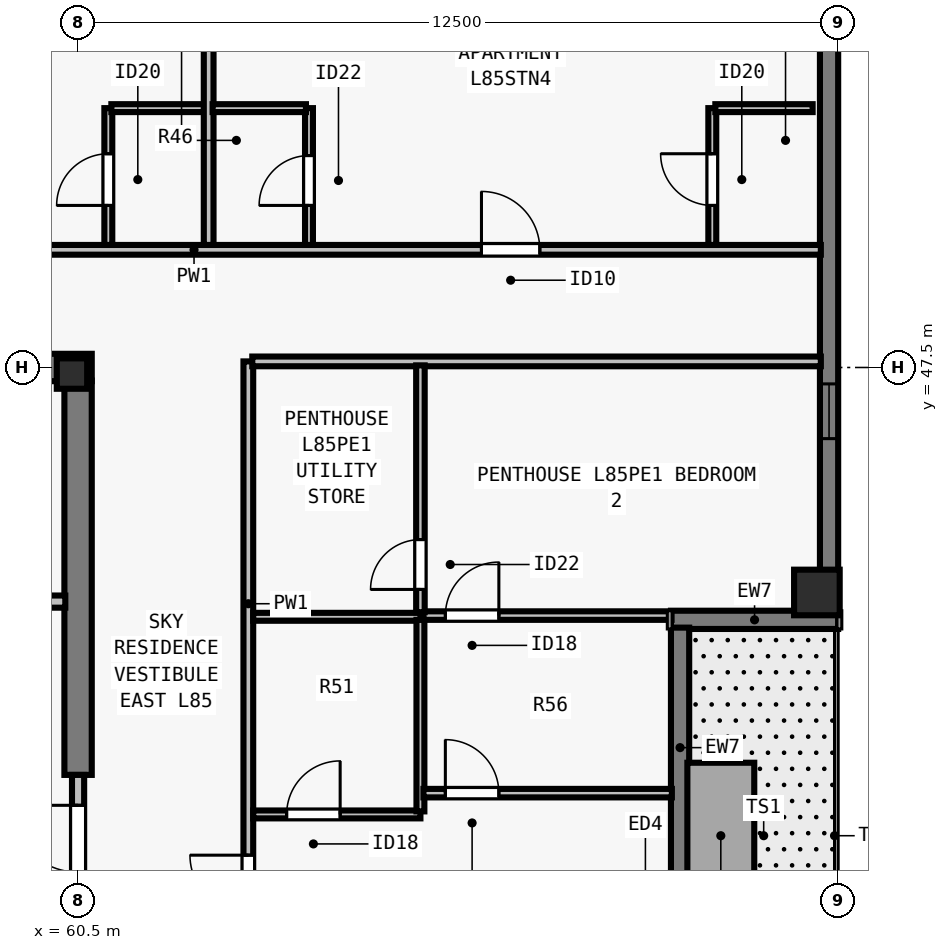
"""IFC4 building model, lengths in metres.
Left out: names, types, materials, properties, quantities, classifications, styles, units other than length and angle.
Written with IfcOpenShell. Run it as: python <this file> out.ifc"""

import sys

from ifc_helpers import new_model, si_unit, direction, frame, frame_2d, origin, origin_2d, place, context, subcontext, project, spatial, rectangle, i_section, extrude, element, fill, save


model = new_model("IFC4")
c1 = context("Model", 3, precision=1e-05, world=origin(), true_north=direction((0.0, 1.0)))
c2 = subcontext(c1, "Body", "Model", "MODEL_VIEW")
j1 = project(units=[si_unit("LENGTHUNIT", "METRE"), si_unit("PLANEANGLEUNIT", "RADIAN")], contexts=[c1])
p1 = place(None, origin())
s1 = spatial("IfcSite", under=j1, at=p1, CompositionType="ELEMENT")
p2 = place(p1, origin())
s2 = spatial("IfcBuilding", under=s1, at=p2, CompositionType="ELEMENT")
p3 = place(p2, frame((0.0, 0.0, 308.5)))
s3 = spatial("IfcBuildingStorey", under=s2, at=p3, CompositionType="ELEMENT", Elevation=308.5)
p4 = place(p3, frame((60.4, 47.4, 0.0), z_axis=(0.0, 0.0, 1.0), x_axis=(1.0, 0.0, 0.0)))
e1 = element("IfcColumn", 1, at=p4, inside=s3, PredefinedType="COLUMN", context=c2, shape_type="SweptSolid", body=[
    extrude(i_section(OverallWidth=0.5, OverallDepth=0.5, WebThickness=0.028, FlangeThickness=0.045, at=origin_2d()), origin(), (0.0, 0.0, 1.0), 3.5),
])
p5 = place(p3, frame((72.65, 43.8, 0.0), z_axis=(0.0, 0.0, 1.0), x_axis=(0.0, 1.0, 0.0)))
e2 = element("IfcColumn", 2, at=p5, inside=s3, PredefinedType="COLUMN", context=c2, shape_type="SweptSolid", body=[
    extrude(rectangle(XDim=0.75, YDim=0.75, at=origin_2d()), origin(), (0.0, 0.0, 1.0), 3.5),
])
p6 = place(p3, frame((72.85, 54.5, 0.0), z_axis=(0.0, 0.0, 1.0), x_axis=(0.0, -1.0, 0.0)))
e3 = element("IfcWall", 3, at=p6, inside=s3, PredefinedType="SOLIDWALL", context=c2, shape_type="SweptSolid", body=[
    extrude(rectangle(XDim=11.022, YDim=0.3, at=frame_2d((5.511, 0.0))), origin(), (0.0, 0.0, 1.0), 3.29),
])
p7 = place(p6, frame((7.27, 0.0, 0.8)))
e4 = element("IfcOpeningElement", 4, at=p7, cuts=e3, PredefinedType="OPENING", context=c2, shape_type="SweptSolid", body=[
    extrude(rectangle(XDim=0.9, YDim=1.75, at=frame_2d((0.45, 0.875))), frame((0.0, 0.16, 0.0), z_axis=(0.0, -1.0, 0.0), x_axis=(1.0, 0.0, 0.0)), (0.0, 0.0, 1.0), 0.32),
])
p8 = place(p3, frame((73.0, 43.35, 0.0), z_axis=(0.0, 0.0, 1.0), x_axis=(-1.0, 0.0, 0.0)))
e5 = element("IfcWall", 5, at=p8, inside=s3, PredefinedType="SOLIDWALL", context=c2, shape_type="SweptSolid", body=[
    extrude(rectangle(XDim=2.75, YDim=0.3, at=frame_2d((1.375, 0.0))), origin(), (0.0, 0.0, 1.0), 3.29),
])
p9 = place(p3, frame((70.4, 43.222, 0.0), z_axis=(0.0, 0.0, 1.0), x_axis=(0.0, -1.0, 0.0)))
e6 = element("IfcWall", 6, at=p9, inside=s3, PredefinedType="SOLIDWALL", context=c2, shape_type="SweptSolid", body=[
    extrude(rectangle(XDim=7.122, YDim=0.3, at=frame_2d((3.561, 0.0))), origin(), (0.0, 0.0, 1.0), 3.29),
])
p10 = place(p9, frame((4.097, 0.0, 0.0)))
e7 = element("IfcOpeningElement", 7, at=p10, cuts=e6, PredefinedType="OPENING", context=c2, shape_type="SweptSolid", body=[
    extrude(rectangle(XDim=1.0, YDim=2.15, at=frame_2d((0.5, 1.075))), frame((0.0, 0.16, 0.0), z_axis=(0.0, -1.0, 0.0), x_axis=(1.0, 0.0, 0.0)), (0.0, 0.0, 1.0), 0.32),
])
p11 = place(p3, frame((43.275, 47.5, 0.0), z_axis=(0.0, 0.0, 1.0), x_axis=(1.0, 0.0, 0.0)))
e8 = element("IfcWall", 8, at=p11, inside=s3, PredefinedType="SHEAR", context=c2, shape_type="SweptSolid", body=[
    extrude(rectangle(XDim=17.45, YDim=0.45, at=frame_2d((8.725, 0.0))), origin(), (0.0, 0.0, 1.0), 3.29),
])
p12 = place(p3, frame((60.5, 40.8, 0.0), z_axis=(0.0, 0.0, 1.0), x_axis=(0.0, 1.0, 0.0)))
e9 = element("IfcWall", 9, at=p12, inside=s3, PredefinedType="SHEAR", context=c2, shape_type="SweptSolid", body=[
    extrude(rectangle(XDim=6.485, YDim=0.45, at=frame_2d((3.242, 0.0))), origin(), (0.0, 0.0, 1.0), 3.29),
])
p13 = place(p3, frame((60.5, 38.75, 0.0), z_axis=(0.0, 0.0, 1.0), x_axis=(0.0, 1.0, 0.0)))
e10 = element("IfcWall", 10, at=p13, inside=s3, PredefinedType="SOLIDWALL", context=c2, shape_type="SweptSolid", body=[
    extrude(rectangle(XDim=2.05, YDim=0.2, at=frame_2d((1.025, 0.0))), origin(), (0.0, 0.0, 1.0), 3.29),
])
p14 = place(p13, frame((0.45, 0.0, 0.0)))
e11 = element("IfcOpeningElement", 11, at=p14, cuts=e10, PredefinedType="OPENING", context=c2, shape_type="SweptSolid", body=[
    extrude(rectangle(XDim=1.1, YDim=2.15, at=frame_2d((0.55, 1.075))), frame((0.0, 0.11, 0.0), z_axis=(0.0, -1.0, 0.0), x_axis=(1.0, 0.0, 0.0)), (0.0, 0.0, 1.0), 0.22),
])
p15 = place(p3, frame((56.735, 43.65, 0.0), z_axis=(0.0, 0.0, 1.0), x_axis=(1.0, 0.0, 0.0)))
e12 = element("IfcWall", 12, at=p15, inside=s3, PredefinedType="SOLIDWALL", context=c2, shape_type="SweptSolid", body=[
    extrude(rectangle(XDim=3.555, YDim=0.2, at=frame_2d((1.777, 0.0))), origin(), (0.0, 0.0, 1.0), 3.29),
])
p16 = place(p15, frame((1.295, 0.0, 0.0)))
e13 = element("IfcOpeningElement", 13, at=p16, cuts=e12, PredefinedType="OPENING", context=c2, shape_type="SweptSolid", body=[
    extrude(rectangle(XDim=1.1, YDim=2.2, at=frame_2d((0.55, 1.1))), frame((0.0, 0.11, 0.0), z_axis=(0.0, -1.0, 0.0), x_axis=(1.0, 0.0, 0.0)), (0.0, 0.0, 1.0), 0.22),
])
p17 = place(p3, frame((31.285, 49.435, 0.0), z_axis=(0.0, 0.0, 1.0), x_axis=(1.0, 0.0, 0.0)))
e14 = element("IfcWall", 14, at=p17, inside=s3, PredefinedType="PARTITIONING", context=c2, shape_type="SweptSolid", body=[
    extrude(rectangle(XDim=41.43, YDim=0.16, at=frame_2d((20.715, 0.0))), origin(), (0.0, 0.0, 1.0), 3.009),
])
p18 = place(p17, frame((4.979, 0.0, 0.0)))
e15 = element("IfcOpeningElement", 15, at=p18, cuts=e14, PredefinedType="OPENING", context=c2, shape_type="SweptSolid", body=[
    extrude(rectangle(XDim=0.96, YDim=2.18, at=frame_2d((0.48, 1.09))), frame((0.0, 0.09, 0.0), z_axis=(0.0, -1.0, 0.0), x_axis=(1.0, 0.0, 0.0)), (0.0, 0.0, 1.0), 0.18),
])
p19 = place(p17, frame((15.145, 0.0, 0.0)))
e16 = element("IfcOpeningElement", 16, at=p19, cuts=e14, PredefinedType="OPENING", context=c2, shape_type="SweptSolid", body=[
    extrude(rectangle(XDim=0.96, YDim=2.18, at=frame_2d((0.48, 1.09))), frame((0.0, 0.09, 0.0), z_axis=(0.0, -1.0, 0.0), x_axis=(1.0, 0.0, 0.0)), (0.0, 0.0, 1.0), 0.18),
])
p20 = place(p17, frame((25.435, 0.0, 0.0)))
e17 = element("IfcOpeningElement", 17, at=p20, cuts=e14, PredefinedType="OPENING", context=c2, shape_type="SweptSolid", body=[
    extrude(rectangle(XDim=0.96, YDim=2.18, at=frame_2d((0.48, 1.09))), frame((0.0, 0.09, 0.0), z_axis=(0.0, -1.0, 0.0), x_axis=(1.0, 0.0, 0.0)), (0.0, 0.0, 1.0), 0.18),
])
p21 = place(p17, frame((35.849, 0.0, 0.0)))
e18 = element("IfcOpeningElement", 18, at=p21, cuts=e14, PredefinedType="OPENING", context=c2, shape_type="SweptSolid", body=[
    extrude(rectangle(XDim=0.96, YDim=2.18, at=frame_2d((0.48, 1.09))), frame((0.0, 0.09, 0.0), z_axis=(0.0, -1.0, 0.0), x_axis=(1.0, 0.0, 0.0)), (0.0, 0.0, 1.0), 0.18),
])
p22 = place(p3, frame((63.3, 30.4, 0.0), z_axis=(0.0, 0.0, 1.0), x_axis=(0.0, 1.0, 0.0)))
e19 = element("IfcWall", 19, at=p22, inside=s3, PredefinedType="PARTITIONING", context=c2, shape_type="SweptSolid", body=[
    extrude(rectangle(XDim=17.2, YDim=0.16, at=frame_2d((8.6, 0.0))), origin(), (0.0, 0.0, 1.0), 3.29),
])
p23 = place(p22, frame((8.12, 0.0, 0.0)))
e20 = element("IfcOpeningElement", 20, at=p23, cuts=e19, PredefinedType="OPENING", context=c2, shape_type="SweptSolid", body=[
    extrude(rectangle(XDim=0.96, YDim=2.18, at=frame_2d((0.48, 1.09))), frame((0.0, 0.09, 0.0), z_axis=(0.0, -1.0, 0.0), x_axis=(1.0, 0.0, 0.0)), (0.0, 0.0, 1.0), 0.18),
])
p24 = place(p3, frame((63.365, 47.6, 0.0), z_axis=(0.0, 0.0, 1.0), x_axis=(1.0, 0.0, 0.0)))
e21 = element("IfcWall", 21, at=p24, inside=s3, PredefinedType="PARTITIONING", context=c2, shape_type="SweptSolid", body=[
    extrude(rectangle(XDim=9.35, YDim=0.16, at=frame_2d((4.675, 0.0))), origin(), (0.0, 0.0, 1.0), 3.29),
])
p25 = place(p3, frame((60.998, 49.515, 0.0), z_axis=(0.0, 0.0, 1.0), x_axis=(0.0, 1.0, 0.0)))
e22 = element("IfcWall", 22, at=p25, inside=s3, PredefinedType="PLUMBINGWALL", context=c2, shape_type="SweptSolid", body=[
    extrude(rectangle(XDim=2.25, YDim=0.13, at=frame_2d((1.125, 0.0))), origin(), (0.0, 0.0, 1.0), 3.29),
])
p26 = place(p25, frame((0.65, 0.0, 0.0)))
e23 = element("IfcOpeningElement", 23, at=p26, cuts=e22, PredefinedType="OPENING", context=c2, shape_type="SweptSolid", body=[
    extrude(rectangle(XDim=0.85, YDim=2.1, at=frame_2d((0.425, 1.05))), frame((0.0, 0.075, 0.0), z_axis=(0.0, -1.0, 0.0), x_axis=(1.0, 0.0, 0.0)), (0.0, 0.0, 1.0), 0.15),
])
p27 = place(p3, frame((61.048, 51.765, 0.0), z_axis=(0.0, 0.0, 1.0), x_axis=(1.0, 0.0, 0.0)))
e24 = element("IfcWall", 24, at=p27, inside=s3, PredefinedType="PLUMBINGWALL", context=c2, shape_type="SweptSolid", body=[
    extrude(rectangle(XDim=1.6, YDim=0.13, at=frame_2d((0.8, 0.0))), origin(), (0.0, 0.0, 1.0), 3.29),
])
p28 = place(p3, frame((62.647, 49.515, 0.0), z_axis=(0.0, 0.0, 1.0), x_axis=(0.0, 1.0, 0.0)))
e25 = element("IfcWall", 25, at=p28, inside=s3, PredefinedType="PARTITIONING", context=c2, shape_type="SweptSolid", body=[
    extrude(rectangle(XDim=10.185, YDim=0.16, at=frame_2d((5.093, 0.0))), origin(), (0.0, 0.0, 1.0), 2.653),
])
p29 = place(p3, frame((64.298, 49.515, 0.0), z_axis=(0.0, 0.0, 1.0), x_axis=(0.0, 1.0, 0.0)))
e26 = element("IfcWall", 26, at=p29, inside=s3, PredefinedType="PLUMBINGWALL", context=c2, shape_type="SweptSolid", body=[
    extrude(rectangle(XDim=2.25, YDim=0.13, at=frame_2d((1.125, 0.0))), origin(), (0.0, 0.0, 1.0), 3.29),
])
p30 = place(p29, frame((0.65, 0.0, 0.0)))
e27 = element("IfcOpeningElement", 27, at=p30, cuts=e26, PredefinedType="OPENING", context=c2, shape_type="SweptSolid", body=[
    extrude(rectangle(XDim=0.82, YDim=2.1, at=frame_2d((0.41, 1.05))), frame((0.0, 0.075, 0.0), z_axis=(0.0, -1.0, 0.0), x_axis=(1.0, 0.0, 0.0)), (0.0, 0.0, 1.0), 0.15),
])
p31 = place(p3, frame((62.712, 51.765, 0.0), z_axis=(0.0, 0.0, 1.0), x_axis=(1.0, 0.0, 0.0)))
e28 = element("IfcWall", 28, at=p31, inside=s3, PredefinedType="PLUMBINGWALL", context=c2, shape_type="SweptSolid", body=[
    extrude(rectangle(XDim=1.535, YDim=0.13, at=frame_2d((0.768, 0.0))), origin(), (0.0, 0.0, 1.0), 3.29),
])
p32 = place(p3, frame((70.93, 49.515, 0.0), z_axis=(0.0, 0.0, 1.0), x_axis=(0.0, 1.0, 0.0)))
e29 = element("IfcWall", 29, at=p32, inside=s3, PredefinedType="PLUMBINGWALL", context=c2, shape_type="SweptSolid", body=[
    extrude(rectangle(XDim=2.25, YDim=0.13, at=frame_2d((1.125, 0.0))), origin(), (0.0, 0.0, 1.0), 3.29),
])
p33 = place(p32, frame((0.65, 0.0, 0.0)))
e30 = element("IfcOpeningElement", 30, at=p33, cuts=e29, PredefinedType="OPENING", context=c2, shape_type="SweptSolid", body=[
    extrude(rectangle(XDim=0.85, YDim=2.1, at=frame_2d((0.425, 1.05))), frame((0.0, 0.075, 0.0), z_axis=(0.0, -1.0, 0.0), x_axis=(1.0, 0.0, 0.0)), (0.0, 0.0, 1.0), 0.15),
])
p34 = place(p3, frame((70.98, 51.765, 0.0), z_axis=(0.0, 0.0, 1.0), x_axis=(1.0, 0.0, 0.0)))
e31 = element("IfcWall", 31, at=p34, inside=s3, PredefinedType="PLUMBINGWALL", context=c2, shape_type="SweptSolid", body=[
    extrude(rectangle(XDim=1.6, YDim=0.13, at=frame_2d((0.8, 0.0))), origin(), (0.0, 0.0, 1.0), 3.29),
])
p35 = place(p3, frame((63.38, 43.4, 0.0), z_axis=(0.0, 0.0, 1.0), x_axis=(1.0, 0.0, 0.0)))
e32 = element("IfcWall", 32, at=p35, inside=s3, PredefinedType="PLUMBINGWALL", context=c2, shape_type="SweptSolid", body=[
    extrude(rectangle(XDim=2.75, YDim=0.13, at=frame_2d((1.375, 0.0))), origin(), (0.0, 0.0, 1.0), 3.29),
])
p36 = place(p3, frame((63.38, 40.15, 0.0), z_axis=(0.0, 0.0, 1.0), x_axis=(1.0, 0.0, 0.0)))
e33 = element("IfcWall", 33, at=p36, inside=s3, PredefinedType="PLUMBINGWALL", context=c2, shape_type="SweptSolid", body=[
    extrude(rectangle(XDim=2.75, YDim=0.13, at=frame_2d((1.375, 0.0))), origin(), (0.0, 0.0, 1.0), 3.29),
])
p37 = place(p36, frame((0.55, 0.0, 0.0)))
e34 = element("IfcOpeningElement", 34, at=p37, cuts=e33, PredefinedType="OPENING", context=c2, shape_type="SweptSolid", body=[
    extrude(rectangle(XDim=0.88, YDim=2.1, at=frame_2d((0.44, 1.05))), frame((0.0, 0.075, 0.0), z_axis=(0.0, -1.0, 0.0), x_axis=(1.0, 0.0, 0.0)), (0.0, 0.0, 1.0), 0.15),
])
p38 = place(p3, frame((66.13, 40.2, 0.0), z_axis=(0.0, 0.0, 1.0), x_axis=(0.0, 1.0, 0.0)))
e35 = element("IfcWall", 35, at=p38, inside=s3, PredefinedType="PLUMBINGWALL", context=c2, shape_type="SweptSolid", body=[
    extrude(rectangle(XDim=3.15, YDim=0.13, at=frame_2d((1.575, 0.0))), origin(), (0.0, 0.0, 1.0), 3.29),
])
p39 = place(p3, frame((66.18, 43.42, 0.0), z_axis=(0.0, 0.0, 1.0), x_axis=(1.0, 0.0, 0.0)))
e36 = element("IfcWall", 36, at=p39, inside=s3, PredefinedType="PARTITIONING", context=c2, shape_type="SweptSolid", body=[
    extrude(rectangle(XDim=4.08, YDim=0.14, at=frame_2d((2.04, 0.0))), origin(), (0.0, 0.0, 1.0), 3.29),
])
p40 = place(p39, frame((0.36, 0.0, 0.0)))
e37 = element("IfcOpeningElement", 37, at=p40, cuts=e36, PredefinedType="OPENING", context=c2, shape_type="SweptSolid", body=[
    extrude(rectangle(XDim=0.88, YDim=2.1, at=frame_2d((0.44, 1.05))), frame((0.0, 0.08, 0.0), z_axis=(0.0, -1.0, 0.0), x_axis=(1.0, 0.0, 0.0)), (0.0, 0.0, 1.0), 0.16),
])
p41 = place(p3, frame((66.13, 43.475, 0.0), z_axis=(0.0, 0.0, 1.0), x_axis=(0.0, 1.0, 0.0)))
e38 = element("IfcWall", 38, at=p41, inside=s3, PredefinedType="PARTITIONING", context=c2, shape_type="SweptSolid", body=[
    extrude(rectangle(XDim=4.06, YDim=0.14, at=frame_2d((2.03, 0.0))), origin(), (0.0, 0.0, 1.0), 3.29),
])
p42 = place(p41, frame((0.375, 0.0, 0.0)))
e39 = element("IfcOpeningElement", 39, at=p42, cuts=e38, PredefinedType="OPENING", context=c2, shape_type="SweptSolid", body=[
    extrude(rectangle(XDim=0.82, YDim=2.1, at=frame_2d((0.41, 1.05))), frame((0.0, 0.08, 0.0), z_axis=(0.0, -1.0, 0.0), x_axis=(1.0, 0.0, 0.0)), (0.0, 0.0, 1.0), 0.16),
])
p43 = place(p3, frame((66.18, 40.5, 0.0), z_axis=(0.0, 0.0, 1.0), x_axis=(1.0, 0.0, 0.0)))
e40 = element("IfcWall", 40, at=p43, inside=s3, PredefinedType="PARTITIONING", context=c2, shape_type="SweptSolid", body=[
    extrude(rectangle(XDim=4.085, YDim=0.14, at=frame_2d((2.042, 0.0))), origin(), (0.0, 0.0, 1.0), 3.29),
])
p44 = place(p43, frame((0.36, 0.0, 0.0)))
e41 = element("IfcOpeningElement", 41, at=p44, cuts=e40, PredefinedType="OPENING", context=c2, shape_type="SweptSolid", body=[
    extrude(rectangle(XDim=0.88, YDim=2.1, at=frame_2d((0.44, 1.05))), frame((0.0, 0.08, 0.0), z_axis=(0.0, -1.0, 0.0), x_axis=(1.0, 0.0, 0.0)), (0.0, 0.0, 1.0), 0.16),
])
p45 = place(p7, origin())
e42 = element("IfcWindow", 42, at=p45, inside=s3, PartitioningType="SINGLE_PANEL", PredefinedType="WINDOW", context=c2, shape_type="SweptSolid", body=[
    extrude(rectangle(XDim=0.9, YDim=1.75, at=frame_2d((0.45, 0.875))), frame((0.0, -0.04, 0.0), z_axis=(0.0, -1.0, 0.0), x_axis=(1.0, 0.0, 0.0)), (0.0, 0.0, 1.0), 0.06),
])
fill(e4, e42)
p46 = place(p14, origin())
e43 = element("IfcDoor", 43, at=p46, inside=s3, OperationType="SINGLE_SWING_RIGHT", PredefinedType="DOOR", context=c2, shape_type="SweptSolid", body=[
    extrude(rectangle(XDim=1.1, YDim=2.15, at=frame_2d((0.55, 1.075))), frame((0.0, 0.025, 0.0), z_axis=(0.0, -1.0, 0.0), x_axis=(1.0, 0.0, 0.0)), (0.0, 0.0, 1.0), 0.05),
])
fill(e11, e43)
p47 = place(p26, origin())
e44 = element("IfcDoor", 44, at=p47, inside=s3, OperationType="SINGLE_SWING_LEFT", PredefinedType="DOOR", context=c2, shape_type="SweptSolid", body=[
    extrude(rectangle(XDim=0.85, YDim=2.1, at=frame_2d((0.425, 1.05))), frame((0.0, 0.025, 0.0), z_axis=(0.0, -1.0, 0.0), x_axis=(1.0, 0.0, 0.0)), (0.0, 0.0, 1.0), 0.05),
])
fill(e23, e44)
p48 = place(p30, origin())
e45 = element("IfcDoor", 45, at=p48, inside=s3, OperationType="SINGLE_SWING_LEFT", PredefinedType="DOOR", context=c2, shape_type="SweptSolid", body=[
    extrude(rectangle(XDim=0.82, YDim=2.1, at=frame_2d((0.41, 1.05))), frame((0.0, 0.025, 0.0), z_axis=(0.0, -1.0, 0.0), x_axis=(1.0, 0.0, 0.0)), (0.0, 0.0, 1.0), 0.05),
])
fill(e27, e45)
p49 = place(p33, origin())
e46 = element("IfcDoor", 46, at=p49, inside=s3, OperationType="SINGLE_SWING_RIGHT", PredefinedType="DOOR", context=c2, shape_type="SweptSolid", body=[
    extrude(rectangle(XDim=0.85, YDim=2.1, at=frame_2d((0.425, 1.05))), frame((0.0, 0.025, 0.0), z_axis=(0.0, -1.0, 0.0), x_axis=(1.0, 0.0, 0.0)), (0.0, 0.0, 1.0), 0.05),
])
fill(e30, e46)
p50 = place(p21, origin())
e47 = element("IfcDoor", 47, at=p50, inside=s3, OperationType="SINGLE_SWING_LEFT", PredefinedType="DOOR", context=c2, shape_type="SweptSolid", body=[
    extrude(rectangle(XDim=0.96, YDim=2.18, at=frame_2d((0.48, 1.09))), frame((0.0, 0.025, 0.0), z_axis=(0.0, -1.0, 0.0), x_axis=(1.0, 0.0, 0.0)), (0.0, 0.0, 1.0), 0.05),
])
fill(e18, e47)
p51 = place(p37, origin())
e48 = element("IfcDoor", 48, at=p51, inside=s3, OperationType="SINGLE_SWING_RIGHT", PredefinedType="DOOR", context=c2, shape_type="SweptSolid", body=[
    extrude(rectangle(XDim=0.88, YDim=2.1, at=frame_2d((0.44, 1.05))), frame((0.0, 0.025, 0.0), z_axis=(0.0, -1.0, 0.0), x_axis=(1.0, 0.0, 0.0)), (0.0, 0.0, 1.0), 0.05),
])
fill(e34, e48)
p52 = place(p42, origin())
e49 = element("IfcDoor", 49, at=p52, inside=s3, OperationType="SINGLE_SWING_LEFT", PredefinedType="DOOR", context=c2, shape_type="SweptSolid", body=[
    extrude(rectangle(XDim=0.82, YDim=2.1, at=frame_2d((0.41, 1.05))), frame((0.0, 0.025, 0.0), z_axis=(0.0, -1.0, 0.0), x_axis=(1.0, 0.0, 0.0)), (0.0, 0.0, 1.0), 0.05),
])
fill(e39, e49)
p53 = place(p40, origin())
e50 = element("IfcDoor", 50, at=p53, inside=s3, OperationType="SINGLE_SWING_RIGHT", PredefinedType="DOOR", context=c2, shape_type="SweptSolid", body=[
    extrude(rectangle(XDim=0.88, YDim=2.1, at=frame_2d((0.44, 1.05))), frame((0.0, 0.025, 0.0), z_axis=(0.0, -1.0, 0.0), x_axis=(1.0, 0.0, 0.0)), (0.0, 0.0, 1.0), 0.05),
])
fill(e37, e50)
p54 = place(p44, origin())
e51 = element("IfcDoor", 51, at=p54, inside=s3, OperationType="SINGLE_SWING_LEFT", PredefinedType="DOOR", context=c2, shape_type="SweptSolid", body=[
    extrude(rectangle(XDim=0.88, YDim=2.1, at=frame_2d((0.44, 1.05))), frame((0.0, 0.025, 0.0), z_axis=(0.0, -1.0, 0.0), x_axis=(1.0, 0.0, 0.0)), (0.0, 0.0, 1.0), 0.05),
])
fill(e41, e51)
p55 = place(p23, origin())
e52 = element("IfcDoor", 52, at=p55, inside=s3, OperationType="SINGLE_SWING_RIGHT", PredefinedType="DOOR", context=c2, shape_type="SweptSolid", body=[
    extrude(rectangle(XDim=0.96, YDim=2.18, at=frame_2d((0.48, 1.09))), frame((0.0, 0.025, 0.0), z_axis=(0.0, -1.0, 0.0), x_axis=(1.0, 0.0, 0.0)), (0.0, 0.0, 1.0), 0.05),
])
fill(e20, e52)
save(model, sys.argv[1])
